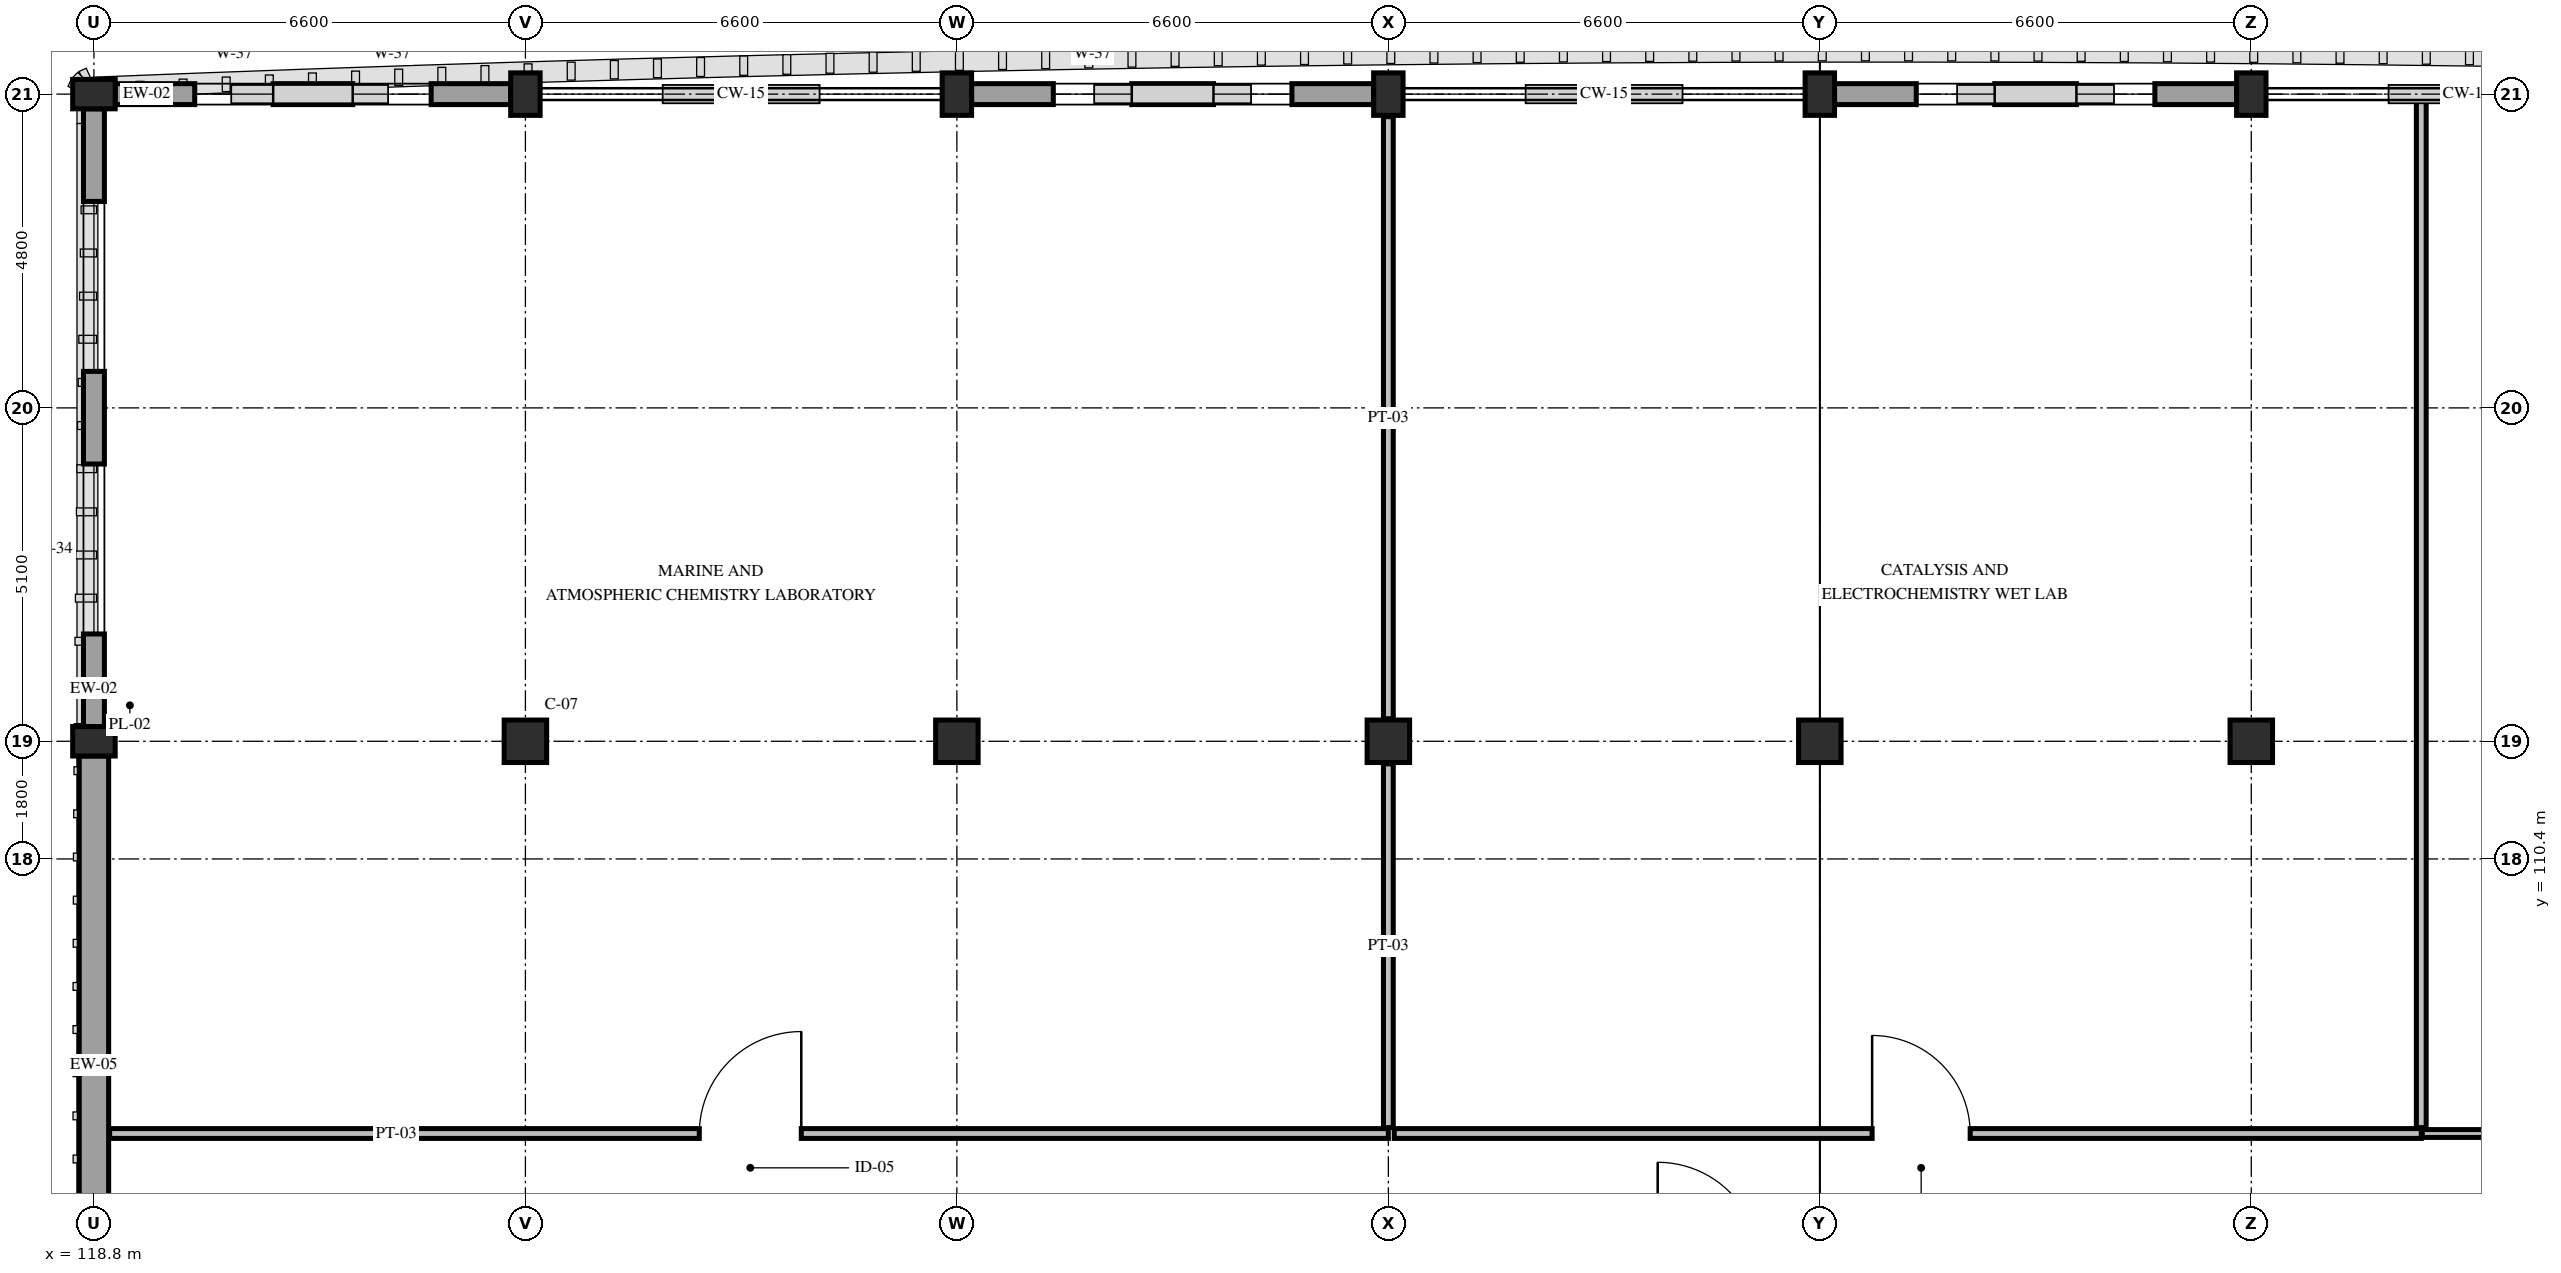
"""IFC4 building model, lengths in metres.
Left out: names, types, materials, properties, quantities, classifications, styles, units other than length and angle.
Written with IfcOpenShell. Run it as: python <this file> out.ifc"""

import sys

from ifc_helpers import new_model, si_unit, direction, frame, frame_2d, origin, origin_2d, place, context, subcontext, project, spatial, rectangle, extrude, element, fill, save


model = new_model("IFC4")
c1 = context("Model", 3, precision=1e-05, world=origin(), true_north=direction((0.0, 1.0)))
c2 = subcontext(c1, "Body", "Model", "MODEL_VIEW")
j1 = project(units=[si_unit("LENGTHUNIT", "METRE"), si_unit("PLANEANGLEUNIT", "RADIAN")], contexts=[c1])
p1 = place(None, origin())
s1 = spatial("IfcSite", under=j1, at=p1, CompositionType="ELEMENT")
p2 = place(p1, origin())
s2 = spatial("IfcBuilding", under=s1, at=p2, CompositionType="ELEMENT")
p3 = place(p2, frame((0.0, 0.0, 24.6)))
s3 = spatial("IfcBuildingStorey", under=s2, at=p3, CompositionType="ELEMENT", Elevation=24.6)
for number, where, z_axis, x_axis in (
    (1, (118.8, 112.2, 0.0), (0.0, 0.0, 1.0), (0.0, 1.0, 0.0)),
    (2, (118.8, 122.1, 0.0), (0.0, 0.0, 1.0), (0.0, 1.0, 0.0)),
):
    element("IfcColumn", number, at=place(p3, frame(where, z_axis=z_axis, x_axis=x_axis)), inside=s3, PredefinedType="PILASTER", context=c2, shape_type="SweptSolid", body=[
        extrude(rectangle(XDim=0.45, YDim=0.65, at=origin_2d()), origin(), (0.0, 0.0, 1.0), 4.8),
    ])
p4 = place(p3, frame((125.4, 112.2, 0.0), z_axis=(0.0, 0.0, 1.0), x_axis=(1.0, 0.0, 0.0)))
e3 = element("IfcColumn", 3, at=p4, inside=s3, PredefinedType="COLUMN", context=c2, shape_type="SweptSolid", body=[
    extrude(rectangle(XDim=0.65, YDim=0.65, at=origin_2d()), origin(), (0.0, 0.0, 1.0), 4.8),
])
p5 = place(p3, frame((125.4, 122.1, 0.0), z_axis=(0.0, 0.0, 1.0), x_axis=(1.0, 0.0, 0.0)))
e4 = element("IfcColumn", 4, at=p5, inside=s3, PredefinedType="PILASTER", context=c2, shape_type="SweptSolid", body=[
    extrude(rectangle(XDim=0.45, YDim=0.65, at=origin_2d()), origin(), (0.0, 0.0, 1.0), 4.8),
])
p6 = place(p3, frame((132.0, 112.2, 0.0), z_axis=(0.0, 0.0, 1.0), x_axis=(1.0, 0.0, 0.0)))
e5 = element("IfcColumn", 5, at=p6, inside=s3, PredefinedType="COLUMN", context=c2, shape_type="SweptSolid", body=[
    extrude(rectangle(XDim=0.65, YDim=0.65, at=origin_2d()), origin(), (0.0, 0.0, 1.0), 4.8),
])
p7 = place(p3, frame((132.0, 122.1, 0.0), z_axis=(0.0, 0.0, 1.0), x_axis=(1.0, 0.0, 0.0)))
e6 = element("IfcColumn", 6, at=p7, inside=s3, PredefinedType="PILASTER", context=c2, shape_type="SweptSolid", body=[
    extrude(rectangle(XDim=0.45, YDim=0.65, at=origin_2d()), origin(), (0.0, 0.0, 1.0), 4.8),
])
p8 = place(p3, frame((138.6, 112.2, 0.0), z_axis=(0.0, 0.0, 1.0), x_axis=(1.0, 0.0, 0.0)))
e7 = element("IfcColumn", 7, at=p8, inside=s3, PredefinedType="COLUMN", context=c2, shape_type="SweptSolid", body=[
    extrude(rectangle(XDim=0.65, YDim=0.65, at=origin_2d()), origin(), (0.0, 0.0, 1.0), 4.8),
])
p9 = place(p3, frame((138.6, 122.1, 0.0), z_axis=(0.0, 0.0, 1.0), x_axis=(1.0, 0.0, 0.0)))
e8 = element("IfcColumn", 8, at=p9, inside=s3, PredefinedType="PILASTER", context=c2, shape_type="SweptSolid", body=[
    extrude(rectangle(XDim=0.45, YDim=0.65, at=origin_2d()), origin(), (0.0, 0.0, 1.0), 4.8),
])
p10 = place(p3, frame((145.2, 112.2, 0.0), z_axis=(0.0, 0.0, 1.0), x_axis=(1.0, 0.0, 0.0)))
e9 = element("IfcColumn", 9, at=p10, inside=s3, PredefinedType="COLUMN", context=c2, shape_type="SweptSolid", body=[
    extrude(rectangle(XDim=0.65, YDim=0.65, at=origin_2d()), origin(), (0.0, 0.0, 1.0), 4.8),
])
p11 = place(p3, frame((145.2, 122.1, 0.0), z_axis=(0.0, 0.0, 1.0), x_axis=(1.0, 0.0, 0.0)))
e10 = element("IfcColumn", 10, at=p11, inside=s3, PredefinedType="PILASTER", context=c2, shape_type="SweptSolid", body=[
    extrude(rectangle(XDim=0.45, YDim=0.65, at=origin_2d()), origin(), (0.0, 0.0, 1.0), 4.8),
])
p12 = place(p3, frame((151.8, 112.2, 0.0), z_axis=(0.0, 0.0, 1.0), x_axis=(1.0, 0.0, 0.0)))
e11 = element("IfcColumn", 11, at=p12, inside=s3, PredefinedType="COLUMN", context=c2, shape_type="SweptSolid", body=[
    extrude(rectangle(XDim=0.65, YDim=0.65, at=origin_2d()), origin(), (0.0, 0.0, 1.0), 4.8),
])
p13 = place(p3, frame((151.8, 122.1, 0.0), z_axis=(0.0, 0.0, 1.0), x_axis=(1.0, 0.0, 0.0)))
e12 = element("IfcColumn", 12, at=p13, inside=s3, PredefinedType="PILASTER", context=c2, shape_type="SweptSolid", body=[
    extrude(rectangle(XDim=0.45, YDim=0.65, at=origin_2d()), origin(), (0.0, 0.0, 1.0), 4.8),
])
p14 = place(p3, frame((118.8, 102.525, 0.0), z_axis=(0.0, 0.0, 1.0), x_axis=(0.0, 1.0, 0.0)))
e13 = element("IfcWall", 13, at=p14, inside=s3, PredefinedType="SOLIDWALL", context=c2, shape_type="SweptSolid", body=[
    extrude(rectangle(XDim=9.45, YDim=0.45, at=frame_2d((4.725, 0.0))), origin(), (0.0, 0.0, 1.0), 3.95),
])
p15 = place(p3, frame((118.8, 112.425, 0.0), z_axis=(0.0, 0.0, 1.0), x_axis=(0.0, 1.0, 0.0)))
e14 = element("IfcWall", 14, at=p15, inside=s3, PredefinedType="STANDARD", context=c2, shape_type="SweptSolid", body=[
    extrude(rectangle(XDim=9.45, YDim=0.32, at=frame_2d((4.725, 0.0))), origin(), (0.0, 0.0, 1.0), 3.95),
])
p16 = place(p15, frame((1.417, 0.0, 0.85)))
e15 = element("IfcOpeningElement", 15, at=p16, cuts=e14, PredefinedType="OPENING", context=c2, shape_type="SweptSolid", body=[
    extrude(rectangle(XDim=2.6, YDim=1.88, at=frame_2d((1.3, 0.94))), frame((0.0, 0.175, 0.0), z_axis=(0.0, -1.0, 0.0), x_axis=(1.0, 0.0, 0.0)), (0.0, 0.0, 1.0), 0.35),
])
p17 = place(p15, frame((5.433, 0.0, 0.85)))
e16 = element("IfcOpeningElement", 16, at=p17, cuts=e14, PredefinedType="OPENING", context=c2, shape_type="SweptSolid", body=[
    extrude(rectangle(XDim=2.6, YDim=1.88, at=frame_2d((1.3, 0.94))), frame((0.0, 0.175, 0.0), z_axis=(0.0, -1.0, 0.0), x_axis=(1.0, 0.0, 0.0)), (0.0, 0.0, 1.0), 0.35),
])
p18 = place(p3, frame((119.125, 122.1, 0.0), z_axis=(0.0, 0.0, 1.0), x_axis=(1.0, 0.0, 0.0)))
e17 = element("IfcWall", 17, at=p18, inside=s3, PredefinedType="STANDARD", context=c2, shape_type="SweptSolid", body=[
    extrude(rectangle(XDim=6.05, YDim=0.32, at=frame_2d((3.025, 0.0))), origin(), (0.0, 0.0, 1.0), 3.78),
])
p19 = place(p18, frame((1.217, 0.0, 0.85)))
e18 = element("IfcOpeningElement", 18, at=p19, cuts=e17, PredefinedType="OPENING", context=c2, shape_type="SweptSolid", body=[
    extrude(rectangle(XDim=1.2, YDim=2.08, at=frame_2d((0.6, 1.04))), frame((0.0, 0.175, 0.0), z_axis=(0.0, -1.0, 0.0), x_axis=(1.0, 0.0, 0.0)), (0.0, 0.0, 1.0), 0.35),
])
p20 = place(p18, frame((3.633, 0.0, 0.85)))
e19 = element("IfcOpeningElement", 19, at=p20, cuts=e17, PredefinedType="OPENING", context=c2, shape_type="SweptSolid", body=[
    extrude(rectangle(XDim=1.2, YDim=2.08, at=frame_2d((0.6, 1.04))), frame((0.0, 0.175, 0.0), z_axis=(0.0, -1.0, 0.0), x_axis=(1.0, 0.0, 0.0)), (0.0, 0.0, 1.0), 0.35),
])
p21 = place(p3, frame((132.225, 122.1, 0.0), z_axis=(0.0, 0.0, 1.0), x_axis=(1.0, 0.0, 0.0)))
e20 = element("IfcWall", 20, at=p21, inside=s3, PredefinedType="STANDARD", context=c2, shape_type="SweptSolid", body=[
    extrude(rectangle(XDim=6.15, YDim=0.32, at=frame_2d((3.075, 0.0))), origin(), (0.0, 0.0, 1.0), 3.78),
])
p22 = place(p21, frame((1.25, 0.0, 0.85)))
e21 = element("IfcOpeningElement", 21, at=p22, cuts=e20, PredefinedType="OPENING", context=c2, shape_type="SweptSolid", body=[
    extrude(rectangle(XDim=1.2, YDim=2.08, at=frame_2d((0.6, 1.04))), frame((0.0, 0.175, 0.0), z_axis=(0.0, -1.0, 0.0), x_axis=(1.0, 0.0, 0.0)), (0.0, 0.0, 1.0), 0.35),
])
p23 = place(p21, frame((3.7, 0.0, 0.85)))
e22 = element("IfcOpeningElement", 22, at=p23, cuts=e20, PredefinedType="OPENING", context=c2, shape_type="SweptSolid", body=[
    extrude(rectangle(XDim=1.2, YDim=2.08, at=frame_2d((0.6, 1.04))), frame((0.0, 0.175, 0.0), z_axis=(0.0, -1.0, 0.0), x_axis=(1.0, 0.0, 0.0)), (0.0, 0.0, 1.0), 0.35),
])
p24 = place(p3, frame((145.425, 122.1, 0.0), z_axis=(0.0, 0.0, 1.0), x_axis=(1.0, 0.0, 0.0)))
e23 = element("IfcWall", 23, at=p24, inside=s3, PredefinedType="STANDARD", context=c2, shape_type="SweptSolid", body=[
    extrude(rectangle(XDim=6.15, YDim=0.32, at=frame_2d((3.075, 0.0))), origin(), (0.0, 0.0, 1.0), 3.78),
])
p25 = place(p24, frame((1.25, 0.0, 0.85)))
e24 = element("IfcOpeningElement", 24, at=p25, cuts=e23, PredefinedType="OPENING", context=c2, shape_type="SweptSolid", body=[
    extrude(rectangle(XDim=1.2, YDim=2.08, at=frame_2d((0.6, 1.04))), frame((0.0, 0.175, 0.0), z_axis=(0.0, -1.0, 0.0), x_axis=(1.0, 0.0, 0.0)), (0.0, 0.0, 1.0), 0.35),
])
p26 = place(p24, frame((3.7, 0.0, 0.85)))
e25 = element("IfcOpeningElement", 25, at=p26, cuts=e23, PredefinedType="OPENING", context=c2, shape_type="SweptSolid", body=[
    extrude(rectangle(XDim=1.2, YDim=2.08, at=frame_2d((0.6, 1.04))), frame((0.0, 0.175, 0.0), z_axis=(0.0, -1.0, 0.0), x_axis=(1.0, 0.0, 0.0)), (0.0, 0.0, 1.0), 0.35),
])
p27 = place(p3, frame((119.04, 106.2, 0.0), z_axis=(0.0, 0.0, 1.0), x_axis=(1.0, 0.0, 0.0)))
e26 = element("IfcWall", 26, at=p27, inside=s3, PredefinedType="PARTITIONING", context=c2, shape_type="SweptSolid", body=[
    extrude(rectangle(XDim=19.56, YDim=0.15, at=frame_2d((9.78, 0.0))), origin(), (0.0, 0.0, 1.0), 3.78),
])
p28 = place(p27, frame((9.02, 0.0, 0.0)))
e27 = element("IfcOpeningElement", 27, at=p28, cuts=e26, PredefinedType="OPENING", context=c2, shape_type="SweptSolid", body=[
    extrude(rectangle(XDim=1.56, YDim=2.3, at=frame_2d((0.78, 1.15))), frame((0.0, 0.09, 0.0), z_axis=(0.0, -1.0, 0.0), x_axis=(1.0, 0.0, 0.0)), (0.0, 0.0, 1.0), 0.18),
])
p29 = place(p3, frame((138.6, 106.29, 0.0), z_axis=(0.0, 0.0, 1.0), x_axis=(0.0, 1.0, 0.0)))
e28 = element("IfcWall", 28, at=p29, inside=s3, PredefinedType="PARTITIONING", context=c2, shape_type="SweptSolid", body=[
    extrude(rectangle(XDim=5.565, YDim=0.15, at=frame_2d((2.782, 0.0))), origin(), (0.0, 0.0, 1.0), 3.78),
])
p30 = place(p3, frame((138.6, 112.545, 0.0), z_axis=(0.0, 0.0, 1.0), x_axis=(0.0, 1.0, 0.0)))
e29 = element("IfcWall", 29, at=p30, inside=s3, PredefinedType="PARTITIONING", context=c2, shape_type="SweptSolid", body=[
    extrude(rectangle(XDim=9.21, YDim=0.15, at=frame_2d((4.605, 0.0))), origin(), (0.0, 0.0, 1.0), 3.78),
])
p31 = place(p3, frame((138.69, 106.2, 0.0), z_axis=(0.0, 0.0, 1.0), x_axis=(1.0, 0.0, 0.0)))
e30 = element("IfcWall", 30, at=p31, inside=s3, PredefinedType="PARTITIONING", context=c2, shape_type="SweptSolid", body=[
    extrude(rectangle(XDim=15.71, YDim=0.15, at=frame_2d((7.855, 0.0))), origin(), (0.0, 0.0, 1.0), 3.78),
])
p32 = place(p31, frame((7.31, 0.0, 0.0)))
e31 = element("IfcOpeningElement", 31, at=p32, cuts=e30, PredefinedType="OPENING", context=c2, shape_type="SweptSolid", body=[
    extrude(rectangle(XDim=1.5, YDim=2.25, at=frame_2d((0.75, 1.125))), frame((0.0, 0.09, 0.0), z_axis=(0.0, -1.0, 0.0), x_axis=(1.0, 0.0, 0.0)), (0.0, 0.0, 1.0), 0.18),
])
p33 = place(p3, frame((154.4, 106.29, 0.0), z_axis=(0.0, 0.0, 1.0), x_axis=(0.0, 1.0, 0.0)))
e32 = element("IfcWall", 32, at=p33, inside=s3, PredefinedType="PARTITIONING", context=c2, shape_type="SweptSolid", body=[
    extrude(rectangle(XDim=15.77, YDim=0.15, at=frame_2d((7.885, 0.0))), origin(), (0.0, 0.0, 1.0), 3.93),
])
p34 = place(p3, frame((154.415, 106.2, 0.0), z_axis=(0.0, 0.0, 1.0), x_axis=(1.0, 0.0, 0.0)))
e33 = element("IfcWall", 33, at=p34, inside=s3, PredefinedType="PARTITIONING", context=c2, shape_type="SweptSolid", body=[
    extrude(rectangle(XDim=18.81, YDim=0.12, at=frame_2d((9.405, 0.0))), origin(), (0.0, 0.0, 1.0), 3.78),
])
p35 = place(p34, frame((11.345, 0.0, 0.0)))
e34 = element("IfcOpeningElement", 34, at=p35, cuts=e33, PredefinedType="OPENING", context=c2, shape_type="SweptSolid", body=[
    extrude(rectangle(XDim=1.58, YDim=2.3, at=frame_2d((0.79, 1.15))), frame((0.0, 0.075, 0.0), z_axis=(0.0, -1.0, 0.0), x_axis=(1.0, 0.0, 0.0)), (0.0, 0.0, 1.0), 0.15),
])
p36 = place(p16, origin())
e35 = element("IfcWindow", 35, at=p36, inside=s3, PartitioningType="DOUBLE_PANEL_VERTICAL", PredefinedType="WINDOW", context=c2, shape_type="SweptSolid", body=[
    extrude(rectangle(XDim=2.6, YDim=1.88, at=frame_2d((1.3, 0.94))), frame((0.0, 0.03, 0.0), z_axis=(0.0, -1.0, 0.0), x_axis=(1.0, 0.0, 0.0)), (0.0, 0.0, 1.0), 0.06),
])
fill(e15, e35)
p37 = place(p17, origin())
e36 = element("IfcWindow", 36, at=p37, inside=s3, PartitioningType="DOUBLE_PANEL_VERTICAL", PredefinedType="WINDOW", context=c2, shape_type="SweptSolid", body=[
    extrude(rectangle(XDim=2.6, YDim=1.88, at=frame_2d((1.3, 0.94))), frame((0.0, 0.03, 0.0), z_axis=(0.0, -1.0, 0.0), x_axis=(1.0, 0.0, 0.0)), (0.0, 0.0, 1.0), 0.06),
])
fill(e16, e36)
p38 = place(p19, origin())
e37 = element("IfcWindow", 37, at=p38, inside=s3, PartitioningType="SINGLE_PANEL", PredefinedType="WINDOW", context=c2, shape_type="SweptSolid", body=[
    extrude(rectangle(XDim=1.2, YDim=2.08, at=frame_2d((0.6, 1.04))), frame((0.0, 0.03, 0.0), z_axis=(0.0, -1.0, 0.0), x_axis=(1.0, 0.0, 0.0)), (0.0, 0.0, 1.0), 0.06),
])
fill(e18, e37)
p39 = place(p20, origin())
e38 = element("IfcWindow", 38, at=p39, inside=s3, PartitioningType="SINGLE_PANEL", PredefinedType="WINDOW", context=c2, shape_type="SweptSolid", body=[
    extrude(rectangle(XDim=1.2, YDim=2.08, at=frame_2d((0.6, 1.04))), frame((0.0, 0.03, 0.0), z_axis=(0.0, -1.0, 0.0), x_axis=(1.0, 0.0, 0.0)), (0.0, 0.0, 1.0), 0.06),
])
fill(e19, e38)
p40 = place(p22, origin())
e39 = element("IfcWindow", 39, at=p40, inside=s3, PartitioningType="SINGLE_PANEL", PredefinedType="WINDOW", context=c2, shape_type="SweptSolid", body=[
    extrude(rectangle(XDim=1.2, YDim=2.08, at=frame_2d((0.6, 1.04))), frame((0.0, 0.03, 0.0), z_axis=(0.0, -1.0, 0.0), x_axis=(1.0, 0.0, 0.0)), (0.0, 0.0, 1.0), 0.06),
])
fill(e21, e39)
p41 = place(p23, origin())
e40 = element("IfcWindow", 40, at=p41, inside=s3, PartitioningType="SINGLE_PANEL", PredefinedType="WINDOW", context=c2, shape_type="SweptSolid", body=[
    extrude(rectangle(XDim=1.2, YDim=2.08, at=frame_2d((0.6, 1.04))), frame((0.0, 0.03, 0.0), z_axis=(0.0, -1.0, 0.0), x_axis=(1.0, 0.0, 0.0)), (0.0, 0.0, 1.0), 0.06),
])
fill(e22, e40)
p42 = place(p25, origin())
e41 = element("IfcWindow", 41, at=p42, inside=s3, PartitioningType="SINGLE_PANEL", PredefinedType="WINDOW", context=c2, shape_type="SweptSolid", body=[
    extrude(rectangle(XDim=1.2, YDim=2.08, at=frame_2d((0.6, 1.04))), frame((0.0, 0.03, 0.0), z_axis=(0.0, -1.0, 0.0), x_axis=(1.0, 0.0, 0.0)), (0.0, 0.0, 1.0), 0.06),
])
fill(e24, e41)
p43 = place(p26, origin())
e42 = element("IfcWindow", 42, at=p43, inside=s3, PartitioningType="SINGLE_PANEL", PredefinedType="WINDOW", context=c2, shape_type="SweptSolid", body=[
    extrude(rectangle(XDim=1.2, YDim=2.08, at=frame_2d((0.6, 1.04))), frame((0.0, 0.03, 0.0), z_axis=(0.0, -1.0, 0.0), x_axis=(1.0, 0.0, 0.0)), (0.0, 0.0, 1.0), 0.06),
])
fill(e25, e42)
p44 = place(p28, origin())
e43 = element("IfcDoor", 43, at=p44, inside=s3, OperationType="SINGLE_SWING_RIGHT", PredefinedType="DOOR", context=c2, shape_type="SweptSolid", body=[
    extrude(rectangle(XDim=1.56, YDim=2.3, at=frame_2d((0.78, 1.15))), frame((0.0, 0.025, 0.0), z_axis=(0.0, -1.0, 0.0), x_axis=(1.0, 0.0, 0.0)), (0.0, 0.0, 1.0), 0.05),
])
fill(e27, e43)
p45 = place(p32, origin())
e44 = element("IfcDoor", 44, at=p45, inside=s3, OperationType="SINGLE_SWING_LEFT", PredefinedType="DOOR", context=c2, shape_type="SweptSolid", body=[
    extrude(rectangle(XDim=1.5, YDim=2.25, at=frame_2d((0.75, 1.125))), frame((0.0, 0.025, 0.0), z_axis=(0.0, -1.0, 0.0), x_axis=(1.0, 0.0, 0.0)), (0.0, 0.0, 1.0), 0.05),
])
fill(e31, e44)
save(model, sys.argv[1])
